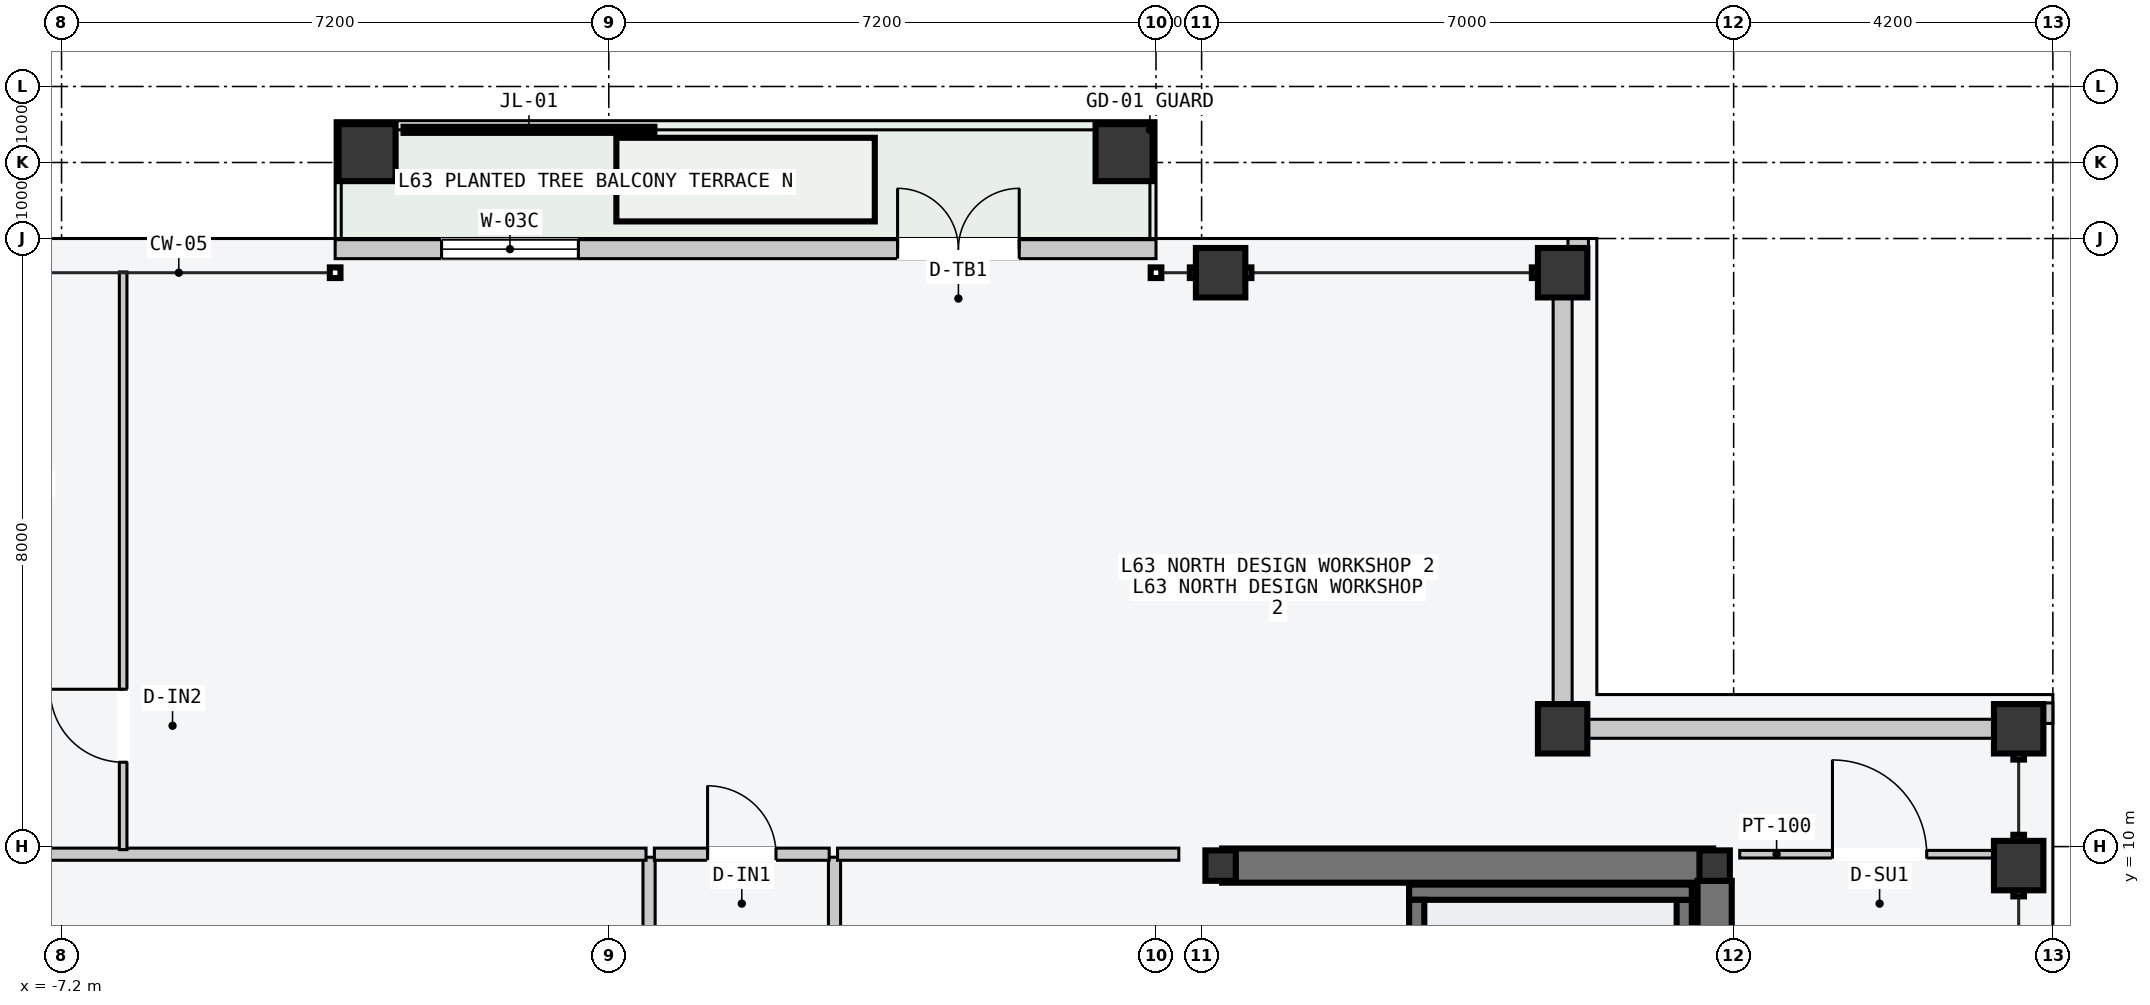
"""IFC4 building model, lengths in metres.
Left out: names, types, materials, properties, quantities, classifications, styles, units other than length and angle.
Written with IfcOpenShell. Run it as: python <this file> out.ifc"""

import sys

from ifc_helpers import new_model, si_unit, direction, frame, frame_2d, origin, origin_2d, place, context, subcontext, project, spatial, rectangle, hollow_rectangle, i_section, extrude, element, fill, save


model = new_model("IFC4")
c1 = context("Model", 3, precision=1e-05, world=origin(), true_north=direction((0.0, 1.0)))
c2 = subcontext(c1, "Body", "Model", "MODEL_VIEW")
j1 = project(units=[si_unit("LENGTHUNIT", "METRE"), si_unit("PLANEANGLEUNIT", "RADIAN")], contexts=[c1])
p1 = place(None, origin())
s1 = spatial("IfcSite", under=j1, at=p1, CompositionType="ELEMENT")
p2 = place(p1, origin())
s2 = spatial("IfcBuilding", under=s1, at=p2, CompositionType="ELEMENT")
p3 = place(p2, frame((0.0, 0.0, 240.0)))
s3 = spatial("IfcBuildingStorey", under=s2, at=p3, CompositionType="ELEMENT", Elevation=240.0)
p4 = place(p3, frame((8.07, 9.75, -0.2), z_axis=(0.0, 0.0, 1.0), x_axis=(1.0, 0.0, 0.0)))
e1 = element("IfcWall", 1, at=p4, inside=s3, PredefinedType="SHEAR", context=c2, shape_type="SweptSolid", body=[
    extrude(rectangle(XDim=6.46, YDim=0.45, at=frame_2d((3.23, 0.0))), origin(), (0.0, 0.0, 1.0), 3.6),
])
p5 = place(p3, frame((14.55, 0.2, -0.2), z_axis=(0.0, 0.0, 1.0), x_axis=(0.0, 1.0, 0.0)))
e2 = element("IfcWall", 2, at=p5, inside=s3, PredefinedType="SHEAR", context=c2, shape_type="SweptSolid", body=[
    extrude(rectangle(XDim=9.35, YDim=0.45, at=frame_2d((4.675, 0.0))), origin(), (0.0, 0.0, 1.0), 3.6),
])
p6 = place(p3, frame((14.15, 1.5, -0.2), z_axis=(0.0, 0.0, 1.0), x_axis=(0.0, 1.0, 0.0)))
e3 = element("IfcWall", 3, at=p6, inside=s3, PredefinedType="SOLIDWALL", context=c2, shape_type="SweptSolid", body=[
    extrude(rectangle(XDim=7.8, YDim=0.2, at=frame_2d((3.9, 0.0))), origin(), (0.0, 0.0, 1.0), 3.6),
])
p7 = place(p3, frame((10.53, 9.4, -0.2), z_axis=(0.0, 0.0, 1.0), x_axis=(1.0, 0.0, 0.0)))
e4 = element("IfcWall", 4, at=p7, inside=s3, PredefinedType="SOLIDWALL", context=c2, shape_type="SweptSolid", body=[
    extrude(rectangle(XDim=3.72, YDim=0.2, at=frame_2d((1.86, 0.0))), origin(), (0.0, 0.0, 1.0), 3.6),
])
p8 = place(p3, frame((10.63, 1.5, -0.2), z_axis=(0.0, 0.0, 1.0), x_axis=(0.0, 1.0, 0.0)))
e5 = element("IfcWall", 5, at=p8, inside=s3, PredefinedType="SOLIDWALL", context=c2, shape_type="SweptSolid", body=[
    extrude(rectangle(XDim=7.8, YDim=0.2, at=frame_2d((3.9, 0.0))), origin(), (0.0, 0.0, 1.0), 3.6),
])
for number, where, z_axis, x_axis in (
    (6, (8.05, 9.75, 0.0), (0.0, 0.0, 1.0), (1.0, 0.0, 0.0)),
    (7, (14.55, 9.75, 0.0), (0.0, 0.0, 1.0), (1.0, 0.0, 0.0)),
):
    element("IfcColumn", number, at=place(p3, frame(where, z_axis=z_axis, x_axis=x_axis)), inside=s3, PredefinedType="COLUMN", context=c2, shape_type="SweptSolid", body=[
        extrude(i_section(OverallWidth=0.4, OverallDepth=0.4, WebThickness=0.013, FlangeThickness=0.021, at=origin_2d()), origin(), (0.0, 0.0, 1.0), 3.6),
    ])
for number, where, z_axis, x_axis in (
    (8, (8.05, 17.55, 0.0), (0.0, 0.0, 1.0), (1.0, 0.0, 0.0)),
    (9, (12.55, 17.55, 0.0), (0.0, 0.0, 1.0), (1.0, 0.0, 0.0)),
    (10, (18.55, 9.75, 0.0), (0.0, 0.0, 1.0), (0.0, 1.0, 0.0)),
    (11, (18.55, 11.55, 0.0), (0.0, 0.0, 1.0), (0.0, 1.0, 0.0)),
    (12, (12.55, 11.55, 0.0), (0.0, 0.0, 1.0), (1.0, 0.0, 0.0)),
):
    element("IfcColumn", number, at=place(p3, frame(where, z_axis=z_axis, x_axis=x_axis)), inside=s3, PredefinedType="COLUMN", context=c2, shape_type="SweptSolid", body=[
        extrude(hollow_rectangle(XDim=0.65, YDim=0.65, WallThickness=0.028, at=origin_2d()), origin(), (0.0, 0.0, 1.0), 3.6),
    ])
for number, where, z_axis, x_axis in (
    (13, (-3.18, 19.13, 0.0), (0.0, 0.0, 1.0), (1.0, 0.0, 0.0)),
    (14, (6.78, 19.13, 0.0), (0.0, 0.0, 1.0), (1.0, 0.0, 0.0)),
):
    element("IfcColumn", number, at=place(p3, frame(where, z_axis=z_axis, x_axis=x_axis)), inside=s3, PredefinedType="COLUMN", context=c2, shape_type="SweptSolid", body=[
        extrude(hollow_rectangle(XDim=0.75, YDim=0.75, WallThickness=0.032, at=origin_2d()), origin(), (0.0, 0.0, 1.0), 3.6),
    ])
p9 = place(p3, frame((-3.6, 17.86, 0.0), z_axis=(0.0, 0.0, 1.0), x_axis=(1.0, 0.0, 0.0)))
e15 = element("IfcWall", 15, at=p9, inside=s3, PredefinedType="STANDARD", context=c2, shape_type="SweptSolid", body=[
    extrude(rectangle(XDim=10.8, YDim=0.25, at=frame_2d((5.4, 0.0))), origin(), (0.0, 0.0, 1.0), 3.4),
])
p10 = place(p9, frame((7.4, 0.0, 0.0)))
e16 = element("IfcOpeningElement", 16, at=p10, cuts=e15, PredefinedType="OPENING", context=c2, shape_type="SweptSolid", body=[
    extrude(rectangle(XDim=1.6, YDim=2.2, at=frame_2d((0.8, 1.1))), frame((0.0, 0.135, 0.0), z_axis=(0.0, -1.0, 0.0), x_axis=(1.0, 0.0, 0.0)), (0.0, 0.0, 1.0), 0.27),
])
p11 = place(p9, frame((1.4, 0.0, 0.85)))
e17 = element("IfcOpeningElement", 17, at=p11, cuts=e15, PredefinedType="OPENING", context=c2, shape_type="SweptSolid", body=[
    extrude(rectangle(XDim=1.8, YDim=2.05, at=frame_2d((0.9, 1.025))), frame((0.0, 0.135, 0.0), z_axis=(0.0, -1.0, 0.0), x_axis=(1.0, 0.0, 0.0)), (0.0, 0.0, 1.0), 0.27),
])
for number, where, z_axis, x_axis in (
    (18, (12.885, 11.55, 0.0), (0.0, 0.0, 1.0), (1.0, 0.0, 0.0)),
    (19, (12.55, 11.885, 0.0), (0.0, 0.0, 1.0), (0.0, 1.0, 0.0)),
):
    element("IfcWall", number, at=place(p3, frame(where, z_axis=z_axis, x_axis=x_axis)), inside=s3, PredefinedType="STANDARD", context=c2, shape_type="SweptSolid", body=[
        extrude(rectangle(XDim=5.33, YDim=0.25, at=frame_2d((2.665, 0.0))), origin(), (0.0, 0.0, 1.0), 2.85),
    ])
for number, where, z_axis, x_axis in (
    (20, (12.62, 17.89, 0.0), (0.0, 0.0, 1.0), (1.0, 0.0, 0.0)),
    (21, (18.89, 11.62, 0.0), (0.0, 0.0, 1.0), (0.0, 1.0, 0.0)),
):
    element("IfcWall", number, at=place(p3, frame(where, z_axis=z_axis, x_axis=x_axis)), inside=s3, PredefinedType="PARAPET", context=c2, shape_type="SweptSolid", body=[
        extrude(rectangle(XDim=0.27, YDim=0.22, at=frame_2d((0.135, 0.0))), origin(), (0.0, 0.0, 1.0), 1.2),
    ])
p12 = place(p3, frame((0.53, -3.5, 0.0), z_axis=(0.0, 0.0, 1.0), x_axis=(0.0, 1.0, 0.0)))
e22 = element("IfcWall", 22, at=p12, inside=s3, PredefinedType="PARTITIONING", context=c2, shape_type="SweptSolid", body=[
    extrude(rectangle(XDim=13.36, YDim=0.16, at=frame_2d((6.68, 0.0))), origin(), (0.0, 0.0, 1.0), 3.4),
])
p13 = place(p12, frame((6.1, 0.0, 0.0)))
e23 = element("IfcOpeningElement", 23, at=p13, cuts=e22, PredefinedType="OPENING", context=c2, shape_type="SweptSolid", body=[
    extrude(rectangle(XDim=1.24, YDim=2.24, at=frame_2d((0.62, 1.12))), frame((0.0, 0.09, 0.0), z_axis=(0.0, -1.0, 0.0), x_axis=(1.0, 0.0, 0.0)), (0.0, 0.0, 1.0), 0.18),
])
p14 = place(p12, frame((1.6, 0.0, 0.0)))
e24 = element("IfcOpeningElement", 24, at=p14, cuts=e22, PredefinedType="OPENING", context=c2, shape_type="SweptSolid", body=[
    extrude(rectangle(XDim=0.96, YDim=2.18, at=frame_2d((0.48, 1.09))), frame((0.0, 0.09, 0.0), z_axis=(0.0, -1.0, 0.0), x_axis=(1.0, 0.0, 0.0)), (0.0, 0.0, 1.0), 0.18),
])
p15 = place(p3, frame((-7.5, 9.9, 0.0), z_axis=(0.0, 0.0, 1.0), x_axis=(1.0, 0.0, 0.0)))
e25 = element("IfcWall", 25, at=p15, inside=s3, PredefinedType="PARTITIONING", context=c2, shape_type="SweptSolid", body=[
    extrude(rectangle(XDim=7.99, YDim=0.16, at=frame_2d((3.995, 0.0))), origin(), (0.0, 0.0, 1.0), 3.4),
])
p16 = place(p3, frame((2.97, -3.5, 0.0), z_axis=(0.0, 0.0, 1.0), x_axis=(0.0, 1.0, 0.0)))
e26 = element("IfcWall", 26, at=p16, inside=s3, PredefinedType="PARTITIONING", context=c2, shape_type="SweptSolid", body=[
    extrude(rectangle(XDim=13.36, YDim=0.16, at=frame_2d((6.68, 0.0))), origin(), (0.0, 0.0, 1.0), 3.4),
])
p17 = place(p16, frame((6.1, 0.0, 0.0)))
e27 = element("IfcOpeningElement", 27, at=p17, cuts=e26, PredefinedType="OPENING", context=c2, shape_type="SweptSolid", body=[
    extrude(rectangle(XDim=1.24, YDim=2.24, at=frame_2d((0.62, 1.12))), frame((0.0, 0.09, 0.0), z_axis=(0.0, -1.0, 0.0), x_axis=(1.0, 0.0, 0.0)), (0.0, 0.0, 1.0), 0.18),
])
p18 = place(p16, frame((1.6, 0.0, 0.0)))
e28 = element("IfcOpeningElement", 28, at=p18, cuts=e26, PredefinedType="OPENING", context=c2, shape_type="SweptSolid", body=[
    extrude(rectangle(XDim=0.96, YDim=2.18, at=frame_2d((0.48, 1.09))), frame((0.0, 0.09, 0.0), z_axis=(0.0, -1.0, 0.0), x_axis=(1.0, 0.0, 0.0)), (0.0, 0.0, 1.0), 0.18),
])
p19 = place(p3, frame((3.01, 9.9, 0.0), z_axis=(0.0, 0.0, 1.0), x_axis=(1.0, 0.0, 0.0)))
e29 = element("IfcWall", 29, at=p19, inside=s3, PredefinedType="PARTITIONING", context=c2, shape_type="SweptSolid", body=[
    extrude(rectangle(XDim=4.49, YDim=0.16, at=frame_2d((2.245, 0.0))), origin(), (0.0, 0.0, 1.0), 3.4),
])
p20 = place(p3, frame((-6.39, 9.96, 0.0), z_axis=(0.0, 0.0, 1.0), x_axis=(0.0, 1.0, 0.0)))
e30 = element("IfcWall", 30, at=p20, inside=s3, PredefinedType="PARTITIONING", context=c2, shape_type="SweptSolid", body=[
    extrude(rectangle(XDim=7.6, YDim=0.1, at=frame_2d((3.8, 0.0))), origin(), (0.0, 0.0, 1.0), 3.4),
])
p21 = place(p20, frame((1.15, 0.0, 0.0)))
e31 = element("IfcOpeningElement", 31, at=p21, cuts=e30, PredefinedType="OPENING", context=c2, shape_type="SweptSolid", body=[
    extrude(rectangle(XDim=0.96, YDim=2.18, at=frame_2d((0.48, 1.09))), frame((0.0, 0.06, 0.0), z_axis=(0.0, -1.0, 0.0), x_axis=(1.0, 0.0, 0.0)), (0.0, 0.0, 1.0), 0.12),
])
p22 = place(p3, frame((0.6, 9.9, 0.0), z_axis=(0.0, 0.0, 1.0), x_axis=(1.0, 0.0, 0.0)))
e32 = element("IfcWall", 32, at=p22, inside=s3, PredefinedType="PARTITIONING", context=c2, shape_type="SweptSolid", body=[
    extrude(rectangle(XDim=2.3, YDim=0.16, at=frame_2d((1.15, 0.0))), origin(), (0.0, 0.0, 1.0), 3.4),
])
p23 = place(p22, frame((0.7, 0.0, 0.0)))
e33 = element("IfcOpeningElement", 33, at=p23, cuts=e32, PredefinedType="OPENING", context=c2, shape_type="SweptSolid", body=[
    extrude(rectangle(XDim=0.9, YDim=2.15, at=frame_2d((0.45, 1.075))), frame((0.0, 0.09, 0.0), z_axis=(0.0, -1.0, 0.0), x_axis=(1.0, 0.0, 0.0)), (0.0, 0.0, 1.0), 0.18),
])
p24 = place(p3, frame((14.88, 9.9, 0.0), z_axis=(0.0, 0.0, 1.0), x_axis=(1.0, 0.0, 0.0)))
e34 = element("IfcWall", 34, at=p24, inside=s3, PredefinedType="PARTITIONING", context=c2, shape_type="SweptSolid", body=[
    extrude(rectangle(XDim=3.68, YDim=0.1, at=frame_2d((1.84, 0.0))), origin(), (0.0, 0.0, 1.0), 3.4),
])
p25 = place(p24, frame((1.22, 0.0, 0.0)))
e35 = element("IfcOpeningElement", 35, at=p25, cuts=e34, PredefinedType="OPENING", context=c2, shape_type="SweptSolid", body=[
    extrude(rectangle(XDim=1.24, YDim=2.24, at=frame_2d((0.62, 1.12))), frame((0.0, 0.06, 0.0), z_axis=(0.0, -1.0, 0.0), x_axis=(1.0, 0.0, 0.0)), (0.0, 0.0, 1.0), 0.12),
])
p26 = place(p10, origin())
e36 = element("IfcDoor", 36, at=p26, inside=s3, OperationType="DOUBLE_DOOR_SINGLE_SWING", PredefinedType="DOOR", context=c2, shape_type="SweptSolid", body=[
    extrude(rectangle(XDim=1.6, YDim=2.2, at=frame_2d((0.8, 1.1))), frame((0.0, 0.025, 0.0), z_axis=(0.0, -1.0, 0.0), x_axis=(1.0, 0.0, 0.0)), (0.0, 0.0, 1.0), 0.05),
])
fill(e16, e36)
p27 = place(p11, origin())
e37 = element("IfcWindow", 37, at=p27, inside=s3, PartitioningType="SINGLE_PANEL", PredefinedType="WINDOW", context=c2, shape_type="SweptSolid", body=[
    extrude(rectangle(XDim=1.8, YDim=2.05, at=frame_2d((0.9, 1.025))), frame((0.0, 0.03, 0.0), z_axis=(0.0, -1.0, 0.0), x_axis=(1.0, 0.0, 0.0)), (0.0, 0.0, 1.0), 0.06),
])
fill(e17, e37)
p28 = place(p21, origin())
e38 = element("IfcDoor", 38, at=p28, inside=s3, OperationType="SINGLE_SWING_RIGHT", PredefinedType="DOOR", context=c2, shape_type="SweptSolid", body=[
    extrude(rectangle(XDim=0.96, YDim=2.18, at=frame_2d((0.48, 1.09))), frame((0.0, 0.025, 0.0), z_axis=(0.0, -1.0, 0.0), x_axis=(1.0, 0.0, 0.0)), (0.0, 0.0, 1.0), 0.05),
])
fill(e31, e38)
p29 = place(p23, origin())
e39 = element("IfcDoor", 39, at=p29, inside=s3, OperationType="SINGLE_SWING_LEFT", PredefinedType="DOOR", context=c2, shape_type="SweptSolid", body=[
    extrude(rectangle(XDim=0.9, YDim=2.15, at=frame_2d((0.45, 1.075))), frame((0.0, 0.025, 0.0), z_axis=(0.0, -1.0, 0.0), x_axis=(1.0, 0.0, 0.0)), (0.0, 0.0, 1.0), 0.05),
])
fill(e33, e39)
p30 = place(p25, origin())
e40 = element("IfcDoor", 40, at=p30, inside=s3, OperationType="SINGLE_SWING_LEFT", PredefinedType="DOOR", context=c2, shape_type="SweptSolid", body=[
    extrude(rectangle(XDim=1.24, YDim=2.24, at=frame_2d((0.62, 1.12))), frame((0.0, 0.025, 0.0), z_axis=(0.0, -1.0, 0.0), x_axis=(1.0, 0.0, 0.0)), (0.0, 0.0, 1.0), 0.05),
])
fill(e35, e40)
save(model, sys.argv[1])
